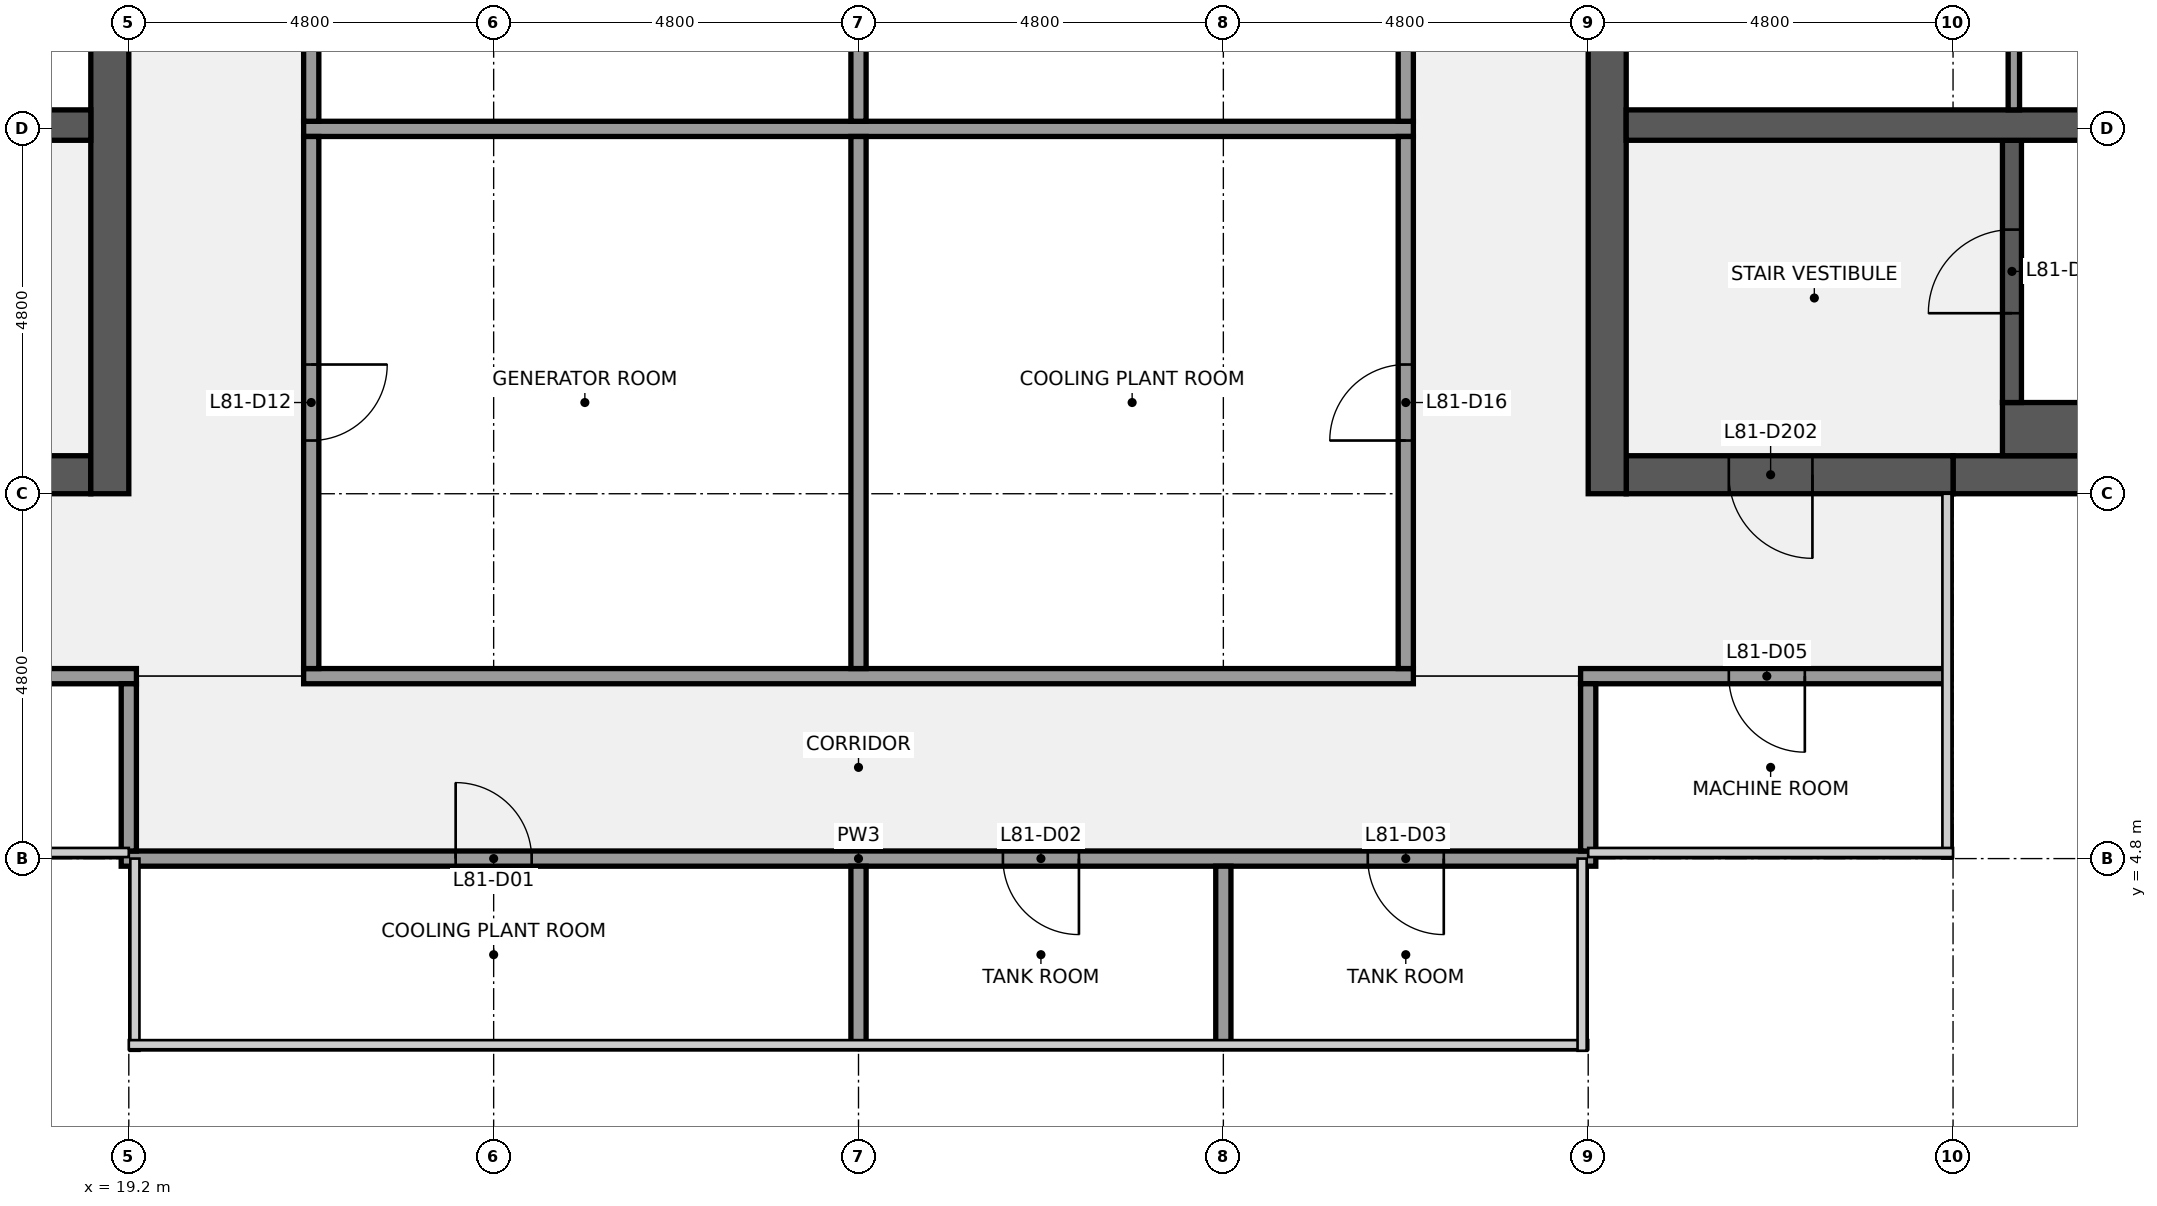
"""IFC4 building model, lengths in metres.
Left out: names, types, materials, properties, quantities, classifications, styles, units other than length and angle.
Written with IfcOpenShell. Run it as: python <this file> out.ifc"""

import sys

from ifc_helpers import new_model, si_unit, direction, frame, frame_2d, origin, place, context, subcontext, project, spatial, rectangle, extrude, element, fill, save


model = new_model("IFC4")
c1 = context("Model", 3, precision=1e-05, world=origin(), true_north=direction((0.0, 1.0)))
c2 = subcontext(c1, "Body", "Model", "MODEL_VIEW")
j1 = project(units=[si_unit("LENGTHUNIT", "METRE"), si_unit("PLANEANGLEUNIT", "RADIAN")], contexts=[c1])
p1 = place(None, origin())
s1 = spatial("IfcSite", under=j1, at=p1, CompositionType="ELEMENT")
p2 = place(p1, origin())
s2 = spatial("IfcBuilding", under=s1, at=p2, CompositionType="ELEMENT")
p3 = place(p2, frame((0.0, 0.0, 362.3)))
s3 = spatial("IfcBuildingStorey", under=s2, at=p3, CompositionType="ELEMENT", Elevation=362.3)
p4 = place(p3, frame((18.7, 9.85, 0.0), z_axis=(0.0, 0.0, 1.0), x_axis=(-1.0, 0.0, 0.0)))
e1 = element("IfcWall", 1, at=p4, inside=s3, PredefinedType="SHEAR", context=c2, shape_type="SweptSolid", body=[
    extrude(rectangle(XDim=4.3, YDim=0.5, at=frame_2d((2.15, 0.0))), origin(), (0.0, 0.0, 1.0), 3.75),
])
p5 = place(p4, frame((1.35, 0.0, 0.0)))
e2 = element("IfcOpeningElement", 2, at=p5, cuts=e1, PredefinedType="OPENING", context=c2, shape_type="SweptSolid", body=[
    extrude(rectangle(XDim=1.1, YDim=2.1, at=frame_2d((0.55, 1.05))), frame((0.0, 0.26, 0.0), z_axis=(0.0, -1.0, 0.0), x_axis=(1.0, 0.0, 0.0)), (0.0, 0.0, 1.0), 0.52),
])
p6 = place(p3, frame((18.95, 38.4, 0.0), z_axis=(0.0, 0.0, 1.0), x_axis=(0.0, -1.0, 0.0)))
e3 = element("IfcWall", 3, at=p6, inside=s3, PredefinedType="SHEAR", context=c2, shape_type="SweptSolid", body=[
    extrude(rectangle(XDim=28.8, YDim=0.5, at=frame_2d((14.4, 0.0))), origin(), (0.0, 0.0, 1.0), 3.75),
])
p7 = place(p6, frame((18.3, 0.0, 0.0)))
e4 = element("IfcOpeningElement", 4, at=p7, cuts=e3, PredefinedType="OPENING", context=c2, shape_type="SweptSolid", body=[
    extrude(rectangle(XDim=1.8, YDim=2.1, at=frame_2d((0.9, 1.05))), frame((0.0, 0.26, 0.0), z_axis=(0.0, -1.0, 0.0), x_axis=(1.0, 0.0, 0.0)), (0.0, 0.0, 1.0), 0.52),
])
p8 = place(p6, frame((8.7, 0.0, 0.0)))
e5 = element("IfcOpeningElement", 5, at=p8, cuts=e3, PredefinedType="OPENING", context=c2, shape_type="SweptSolid", body=[
    extrude(rectangle(XDim=1.8, YDim=2.1, at=frame_2d((0.9, 1.05))), frame((0.0, 0.26, 0.0), z_axis=(0.0, -1.0, 0.0), x_axis=(1.0, 0.0, 0.0)), (0.0, 0.0, 1.0), 0.52),
])
p9 = place(p3, frame((0.5, 14.45, 0.0), z_axis=(0.0, 0.0, 1.0), x_axis=(1.0, 0.0, 0.0)))
e6 = element("IfcWall", 6, at=p9, inside=s3, PredefinedType="SHEAR", context=c2, shape_type="SweptSolid", body=[
    extrude(rectangle(XDim=18.2, YDim=0.4, at=frame_2d((9.1, 0.0))), origin(), (0.0, 0.0, 1.0), 3.75),
])
p10 = place(p3, frame((57.1, 9.85, 0.0), z_axis=(0.0, 0.0, 1.0), x_axis=(-1.0, 0.0, 0.0)))
e7 = element("IfcWall", 7, at=p10, inside=s3, PredefinedType="SHEAR", context=c2, shape_type="SweptSolid", body=[
    extrude(rectangle(XDim=13.9, YDim=0.5, at=frame_2d((6.95, 0.0))), origin(), (0.0, 0.0, 1.0), 3.75),
])
p11 = place(p3, frame((43.2, 9.85, 0.0), z_axis=(0.0, 0.0, 1.0), x_axis=(-1.0, 0.0, 0.0)))
e8 = element("IfcWall", 8, at=p11, inside=s3, PredefinedType="SHEAR", context=c2, shape_type="SweptSolid", body=[
    extrude(rectangle(XDim=4.3, YDim=0.5, at=frame_2d((2.15, 0.0))), origin(), (0.0, 0.0, 1.0), 3.75),
])
p12 = place(p11, frame((1.85, 0.0, 0.0)))
e9 = element("IfcOpeningElement", 9, at=p12, cuts=e8, PredefinedType="OPENING", context=c2, shape_type="SweptSolid", body=[
    extrude(rectangle(XDim=1.1, YDim=2.1, at=frame_2d((0.55, 1.05))), frame((0.0, 0.26, 0.0), z_axis=(0.0, -1.0, 0.0), x_axis=(1.0, 0.0, 0.0)), (0.0, 0.0, 1.0), 0.52),
])
p13 = place(p3, frame((38.65, 9.6, 0.0), z_axis=(0.0, 0.0, 1.0), x_axis=(0.0, 1.0, 0.0)))
e10 = element("IfcWall", 10, at=p13, inside=s3, PredefinedType="SHEAR", context=c2, shape_type="SweptSolid", body=[
    extrude(rectangle(XDim=28.8, YDim=0.5, at=frame_2d((14.4, 0.0))), origin(), (0.0, 0.0, 1.0), 3.75),
])
p14 = place(p13, frame((8.7, 0.0, 0.0)))
e11 = element("IfcOpeningElement", 11, at=p14, cuts=e10, PredefinedType="OPENING", context=c2, shape_type="SweptSolid", body=[
    extrude(rectangle(XDim=1.8, YDim=2.1, at=frame_2d((0.9, 1.05))), frame((0.0, 0.26, 0.0), z_axis=(0.0, -1.0, 0.0), x_axis=(1.0, 0.0, 0.0)), (0.0, 0.0, 1.0), 0.52),
])
p15 = place(p13, frame((18.3, 0.0, 0.0)))
e12 = element("IfcOpeningElement", 12, at=p15, cuts=e10, PredefinedType="OPENING", context=c2, shape_type="SweptSolid", body=[
    extrude(rectangle(XDim=1.8, YDim=2.1, at=frame_2d((0.9, 1.05))), frame((0.0, 0.26, 0.0), z_axis=(0.0, -1.0, 0.0), x_axis=(1.0, 0.0, 0.0)), (0.0, 0.0, 1.0), 0.52),
])
p16 = place(p3, frame((43.85, 10.45, 0.0), z_axis=(0.0, 0.0, 1.0), x_axis=(1.0, 0.0, 0.0)))
e13 = element("IfcWall", 13, at=p16, inside=s3, PredefinedType="SHEAR", context=c2, shape_type="SweptSolid", body=[
    extrude(rectangle(XDim=7.5, YDim=0.7, at=frame_2d((3.75, 0.0))), origin(), (0.0, 0.0, 1.0), 3.75),
])
p17 = place(p3, frame((43.975, 10.8, 0.0), z_axis=(0.0, 0.0, 1.0), x_axis=(0.0, 1.0, 0.0)))
e14 = element("IfcWall", 14, at=p17, inside=s3, PredefinedType="SHEAR", context=c2, shape_type="SweptSolid", body=[
    extrude(rectangle(XDim=3.45, YDim=0.25, at=frame_2d((1.725, 0.0))), origin(), (0.0, 0.0, 1.0), 3.75),
])
p18 = place(p17, frame((1.175, 0.0, 0.0)))
e15 = element("IfcOpeningElement", 15, at=p18, cuts=e14, PredefinedType="OPENING", context=c2, shape_type="SweptSolid", body=[
    extrude(rectangle(XDim=1.1, YDim=2.1, at=frame_2d((0.55, 1.05))), frame((0.0, 0.135, 0.0), z_axis=(0.0, -1.0, 0.0), x_axis=(1.0, 0.0, 0.0)), (0.0, 0.0, 1.0), 0.27),
])
p19 = place(p3, frame((38.9, 14.45, 0.0), z_axis=(0.0, 0.0, 1.0), x_axis=(1.0, 0.0, 0.0)))
e16 = element("IfcWall", 16, at=p19, inside=s3, PredefinedType="SHEAR", context=c2, shape_type="SweptSolid", body=[
    extrude(rectangle(XDim=18.2, YDim=0.4, at=frame_2d((9.1, 0.0))), origin(), (0.0, 0.0, 1.0), 3.75),
])
p20 = place(p3, frame((44.0, 14.65, 0.0), z_axis=(0.0, 0.0, 1.0), x_axis=(0.0, 1.0, 0.0)))
e17 = element("IfcWall", 17, at=p20, inside=s3, PredefinedType="PARTITIONING", context=c2, shape_type="SweptSolid", body=[
    extrude(rectangle(XDim=2.6, YDim=0.15, at=frame_2d((1.3, 0.0))), origin(), (0.0, 0.0, 1.0), 3.75),
])
p21 = place(p3, frame((19.1, 4.8, 0.0), z_axis=(0.0, 0.0, 1.0), x_axis=(1.0, 0.0, 0.0)))
e18 = element("IfcWall", 18, at=p21, inside=s3, PredefinedType="PARTITIONING", context=c2, shape_type="SweptSolid", body=[
    extrude(rectangle(XDim=19.4, YDim=0.2, at=frame_2d((9.7, 0.0))), origin(), (0.0, 0.0, 1.0), 2.759),
])
p22 = place(p21, frame((4.4, 0.0, 0.0)))
e19 = element("IfcOpeningElement", 19, at=p22, cuts=e18, PredefinedType="OPENING", context=c2, shape_type="SweptSolid", body=[
    extrude(rectangle(XDim=1.0, YDim=2.1, at=frame_2d((0.5, 1.05))), frame((0.0, 0.11, 0.0), z_axis=(0.0, -1.0, 0.0), x_axis=(1.0, 0.0, 0.0)), (0.0, 0.0, 1.0), 0.22),
])
p23 = place(p21, frame((11.6, 0.0, 0.0)))
e20 = element("IfcOpeningElement", 20, at=p23, cuts=e18, PredefinedType="OPENING", context=c2, shape_type="SweptSolid", body=[
    extrude(rectangle(XDim=1.0, YDim=2.1, at=frame_2d((0.5, 1.05))), frame((0.0, 0.11, 0.0), z_axis=(0.0, -1.0, 0.0), x_axis=(1.0, 0.0, 0.0)), (0.0, 0.0, 1.0), 0.22),
])
p24 = place(p21, frame((16.4, 0.0, 0.0)))
e21 = element("IfcOpeningElement", 21, at=p24, cuts=e18, PredefinedType="OPENING", context=c2, shape_type="SweptSolid", body=[
    extrude(rectangle(XDim=1.0, YDim=2.1, at=frame_2d((0.5, 1.05))), frame((0.0, 0.11, 0.0), z_axis=(0.0, -1.0, 0.0), x_axis=(1.0, 0.0, 0.0)), (0.0, 0.0, 1.0), 0.22),
])
p25 = place(p3, frame((14.5, 7.2, 0.0), z_axis=(0.0, 0.0, 1.0), x_axis=(1.0, 0.0, 0.0)))
e22 = element("IfcWall", 22, at=p25, inside=s3, PredefinedType="PARTITIONING", context=c2, shape_type="SweptSolid", body=[
    extrude(rectangle(XDim=4.8, YDim=0.2, at=frame_2d((2.4, 0.0))), origin(), (0.0, 0.0, 1.0), 2.759),
])
p26 = place(p25, frame((1.85, 0.0, 0.0)))
e23 = element("IfcOpeningElement", 23, at=p26, cuts=e22, PredefinedType="OPENING", context=c2, shape_type="SweptSolid", body=[
    extrude(rectangle(XDim=1.0, YDim=2.1, at=frame_2d((0.5, 1.05))), frame((0.0, 0.11, 0.0), z_axis=(0.0, -1.0, 0.0), x_axis=(1.0, 0.0, 0.0)), (0.0, 0.0, 1.0), 0.22),
])
p27 = place(p3, frame((21.5, 7.2, 0.0), z_axis=(0.0, 0.0, 1.0), x_axis=(1.0, 0.0, 0.0)))
e24 = element("IfcWall", 24, at=p27, inside=s3, PredefinedType="PARTITIONING", context=c2, shape_type="SweptSolid", body=[
    extrude(rectangle(XDim=14.6, YDim=0.2, at=frame_2d((7.3, 0.0))), origin(), (0.0, 0.0, 1.0), 2.759),
])
p28 = place(p3, frame((38.3, 7.2, 0.0), z_axis=(0.0, 0.0, 1.0), x_axis=(1.0, 0.0, 0.0)))
e25 = element("IfcWall", 25, at=p28, inside=s3, PredefinedType="PARTITIONING", context=c2, shape_type="SweptSolid", body=[
    extrude(rectangle(XDim=4.8, YDim=0.2, at=frame_2d((2.4, 0.0))), origin(), (0.0, 0.0, 1.0), 2.759),
])
p29 = place(p28, frame((1.95, 0.0, 0.0)))
e26 = element("IfcOpeningElement", 26, at=p29, cuts=e25, PredefinedType="OPENING", context=c2, shape_type="SweptSolid", body=[
    extrude(rectangle(XDim=1.0, YDim=2.1, at=frame_2d((0.5, 1.05))), frame((0.0, 0.11, 0.0), z_axis=(0.0, -1.0, 0.0), x_axis=(1.0, 0.0, 0.0)), (0.0, 0.0, 1.0), 0.22),
])
p30 = place(p3, frame((21.5, 14.4, 0.0), z_axis=(0.0, 0.0, 1.0), x_axis=(1.0, 0.0, 0.0)))
e27 = element("IfcWall", 27, at=p30, inside=s3, PredefinedType="PARTITIONING", context=c2, shape_type="SweptSolid", body=[
    extrude(rectangle(XDim=14.6, YDim=0.2, at=frame_2d((7.3, 0.0))), origin(), (0.0, 0.0, 1.0), 2.759),
])
p31 = place(p3, frame((19.2, 4.9, 0.0), z_axis=(0.0, 0.0, 1.0), x_axis=(0.0, 1.0, 0.0)))
e28 = element("IfcWall", 28, at=p31, inside=s3, PredefinedType="PARTITIONING", context=c2, shape_type="SweptSolid", body=[
    extrude(rectangle(XDim=2.2, YDim=0.2, at=frame_2d((1.1, 0.0))), origin(), (0.0, 0.0, 1.0), 2.759),
])
p32 = place(p3, frame((21.6, 7.3, 0.0), z_axis=(0.0, 0.0, 1.0), x_axis=(0.0, 1.0, 0.0)))
e29 = element("IfcWall", 29, at=p32, inside=s3, PredefinedType="PARTITIONING", context=c2, shape_type="SweptSolid", body=[
    extrude(rectangle(XDim=7.0, YDim=0.2, at=frame_2d((3.5, 0.0))), origin(), (0.0, 0.0, 1.0), 2.759),
])
p33 = place(p32, frame((3.0, 0.0, 0.0)))
e30 = element("IfcOpeningElement", 30, at=p33, cuts=e29, PredefinedType="OPENING", context=c2, shape_type="SweptSolid", body=[
    extrude(rectangle(XDim=1.0, YDim=2.1, at=frame_2d((0.5, 1.05))), frame((0.0, 0.11, 0.0), z_axis=(0.0, -1.0, 0.0), x_axis=(1.0, 0.0, 0.0)), (0.0, 0.0, 1.0), 0.22),
])
p34 = place(p3, frame((21.6, 14.5, 0.0), z_axis=(0.0, 0.0, 1.0), x_axis=(0.0, 1.0, 0.0)))
e31 = element("IfcWall", 31, at=p34, inside=s3, PredefinedType="PARTITIONING", context=c2, shape_type="SweptSolid", body=[
    extrude(rectangle(XDim=9.4, YDim=0.2, at=frame_2d((4.7, 0.0))), origin(), (0.0, 0.0, 1.0), 2.759),
])
p35 = place(p34, frame((4.2, 0.0, 0.0)))
e32 = element("IfcOpeningElement", 32, at=p35, cuts=e31, PredefinedType="OPENING", context=c2, shape_type="SweptSolid", body=[
    extrude(rectangle(XDim=1.0, YDim=2.1, at=frame_2d((0.5, 1.05))), frame((0.0, 0.11, 0.0), z_axis=(0.0, -1.0, 0.0), x_axis=(1.0, 0.0, 0.0)), (0.0, 0.0, 1.0), 0.22),
])
p36 = place(p3, frame((28.8, 2.372, 0.0), z_axis=(0.0, 0.0, 1.0), x_axis=(0.0, 1.0, 0.0)))
e33 = element("IfcWall", 33, at=p36, inside=s3, PredefinedType="PARTITIONING", context=c2, shape_type="SweptSolid", body=[
    extrude(rectangle(XDim=2.328, YDim=0.2, at=frame_2d((1.164, 0.0))), origin(), (0.0, 0.0, 1.0), 2.759),
])
p37 = place(p3, frame((28.8, 7.3, 0.0), z_axis=(0.0, 0.0, 1.0), x_axis=(0.0, 1.0, 0.0)))
e34 = element("IfcWall", 34, at=p37, inside=s3, PredefinedType="PARTITIONING", context=c2, shape_type="SweptSolid", body=[
    extrude(rectangle(XDim=7.0, YDim=0.2, at=frame_2d((3.5, 0.0))), origin(), (0.0, 0.0, 1.0), 2.759),
])
p38 = place(p3, frame((28.8, 14.5, 0.0), z_axis=(0.0, 0.0, 1.0), x_axis=(0.0, 1.0, 0.0)))
e35 = element("IfcWall", 35, at=p38, inside=s3, PredefinedType="PARTITIONING", context=c2, shape_type="SweptSolid", body=[
    extrude(rectangle(XDim=9.4, YDim=0.2, at=frame_2d((4.7, 0.0))), origin(), (0.0, 0.0, 1.0), 2.759),
])
p39 = place(p3, frame((33.6, 2.372, 0.0), z_axis=(0.0, 0.0, 1.0), x_axis=(0.0, 1.0, 0.0)))
e36 = element("IfcWall", 36, at=p39, inside=s3, PredefinedType="PARTITIONING", context=c2, shape_type="SweptSolid", body=[
    extrude(rectangle(XDim=2.328, YDim=0.2, at=frame_2d((1.164, 0.0))), origin(), (0.0, 0.0, 1.0), 2.759),
])
p40 = place(p3, frame((36.0, 7.3, 0.0), z_axis=(0.0, 0.0, 1.0), x_axis=(0.0, 1.0, 0.0)))
e37 = element("IfcWall", 37, at=p40, inside=s3, PredefinedType="PARTITIONING", context=c2, shape_type="SweptSolid", body=[
    extrude(rectangle(XDim=7.0, YDim=0.2, at=frame_2d((3.5, 0.0))), origin(), (0.0, 0.0, 1.0), 2.759),
])
p41 = place(p40, frame((3.0, 0.0, 0.0)))
e38 = element("IfcOpeningElement", 38, at=p41, cuts=e37, PredefinedType="OPENING", context=c2, shape_type="SweptSolid", body=[
    extrude(rectangle(XDim=1.0, YDim=2.1, at=frame_2d((0.5, 1.05))), frame((0.0, 0.11, 0.0), z_axis=(0.0, -1.0, 0.0), x_axis=(1.0, 0.0, 0.0)), (0.0, 0.0, 1.0), 0.22),
])
p42 = place(p3, frame((36.0, 14.5, 0.0), z_axis=(0.0, 0.0, 1.0), x_axis=(0.0, 1.0, 0.0)))
e39 = element("IfcWall", 39, at=p42, inside=s3, PredefinedType="PARTITIONING", context=c2, shape_type="SweptSolid", body=[
    extrude(rectangle(XDim=9.4, YDim=0.2, at=frame_2d((4.7, 0.0))), origin(), (0.0, 0.0, 1.0), 2.759),
])
p43 = place(p42, frame((4.2, 0.0, 0.0)))
e40 = element("IfcOpeningElement", 40, at=p43, cuts=e39, PredefinedType="OPENING", context=c2, shape_type="SweptSolid", body=[
    extrude(rectangle(XDim=1.0, YDim=2.1, at=frame_2d((0.5, 1.05))), frame((0.0, 0.11, 0.0), z_axis=(0.0, -1.0, 0.0), x_axis=(1.0, 0.0, 0.0)), (0.0, 0.0, 1.0), 0.22),
])
p44 = place(p3, frame((38.4, 4.9, 0.0), z_axis=(0.0, 0.0, 1.0), x_axis=(0.0, 1.0, 0.0)))
e41 = element("IfcWall", 41, at=p44, inside=s3, PredefinedType="PARTITIONING", context=c2, shape_type="SweptSolid", body=[
    extrude(rectangle(XDim=2.2, YDim=0.2, at=frame_2d((1.1, 0.0))), origin(), (0.0, 0.0, 1.0), 2.759),
])
p45 = place(p18, origin())
e42 = element("IfcDoor", 42, at=p45, inside=s3, OperationType="SINGLE_SWING_LEFT", PredefinedType="DOOR", context=c2, shape_type="SweptSolid", body=[
    extrude(rectangle(XDim=1.1, YDim=2.1, at=frame_2d((0.55, 1.05))), frame((0.0, 0.025, 0.0), z_axis=(0.0, -1.0, 0.0), x_axis=(1.0, 0.0, 0.0)), (0.0, 0.0, 1.0), 0.05),
])
fill(e15, e42)
p46 = place(p12, origin())
e43 = element("IfcDoor", 43, at=p46, inside=s3, OperationType="SINGLE_SWING_LEFT", PredefinedType="DOOR", context=c2, shape_type="SweptSolid", body=[
    extrude(rectangle(XDim=1.1, YDim=2.1, at=frame_2d((0.55, 1.05))), frame((0.0, 0.025, 0.0), z_axis=(0.0, -1.0, 0.0), x_axis=(1.0, 0.0, 0.0)), (0.0, 0.0, 1.0), 0.05),
])
fill(e9, e43)
p47 = place(p22, origin())
e44 = element("IfcDoor", 44, at=p47, inside=s3, OperationType="SINGLE_SWING_LEFT", PredefinedType="DOOR", context=c2, shape_type="SweptSolid", body=[
    extrude(rectangle(XDim=1.0, YDim=2.1, at=frame_2d((0.5, 1.05))), frame((0.0, 0.025, 0.0), z_axis=(0.0, -1.0, 0.0), x_axis=(1.0, 0.0, 0.0)), (0.0, 0.0, 1.0), 0.05),
])
fill(e19, e44)
p48 = place(p23, origin())
e45 = element("IfcDoor", 45, at=p48, inside=s3, OperationType="SINGLE_SWING_RIGHT", PredefinedType="DOOR", context=c2, shape_type="SweptSolid", body=[
    extrude(rectangle(XDim=1.0, YDim=2.1, at=frame_2d((0.5, 1.05))), frame((0.0, 0.025, 0.0), z_axis=(0.0, -1.0, 0.0), x_axis=(1.0, 0.0, 0.0)), (0.0, 0.0, 1.0), 0.05),
])
fill(e20, e45)
p49 = place(p24, origin())
e46 = element("IfcDoor", 46, at=p49, inside=s3, OperationType="SINGLE_SWING_RIGHT", PredefinedType="DOOR", context=c2, shape_type="SweptSolid", body=[
    extrude(rectangle(XDim=1.0, YDim=2.1, at=frame_2d((0.5, 1.05))), frame((0.0, 0.025, 0.0), z_axis=(0.0, -1.0, 0.0), x_axis=(1.0, 0.0, 0.0)), (0.0, 0.0, 1.0), 0.05),
])
fill(e21, e46)
p50 = place(p29, origin())
e47 = element("IfcDoor", 47, at=p50, inside=s3, OperationType="SINGLE_SWING_RIGHT", PredefinedType="DOOR", context=c2, shape_type="SweptSolid", body=[
    extrude(rectangle(XDim=1.0, YDim=2.1, at=frame_2d((0.5, 1.05))), frame((0.0, 0.025, 0.0), z_axis=(0.0, -1.0, 0.0), x_axis=(1.0, 0.0, 0.0)), (0.0, 0.0, 1.0), 0.05),
])
fill(e26, e47)
p51 = place(p33, origin())
e48 = element("IfcDoor", 48, at=p51, inside=s3, OperationType="SINGLE_SWING_RIGHT", PredefinedType="DOOR", context=c2, shape_type="SweptSolid", body=[
    extrude(rectangle(XDim=1.0, YDim=2.1, at=frame_2d((0.5, 1.05))), frame((0.0, 0.025, 0.0), z_axis=(0.0, -1.0, 0.0), x_axis=(1.0, 0.0, 0.0)), (0.0, 0.0, 1.0), 0.05),
])
fill(e30, e48)
p52 = place(p41, origin())
e49 = element("IfcDoor", 49, at=p52, inside=s3, OperationType="SINGLE_SWING_LEFT", PredefinedType="DOOR", context=c2, shape_type="SweptSolid", body=[
    extrude(rectangle(XDim=1.0, YDim=2.1, at=frame_2d((0.5, 1.05))), frame((0.0, 0.025, 0.0), z_axis=(0.0, -1.0, 0.0), x_axis=(1.0, 0.0, 0.0)), (0.0, 0.0, 1.0), 0.05),
])
fill(e38, e49)
save(model, sys.argv[1])
